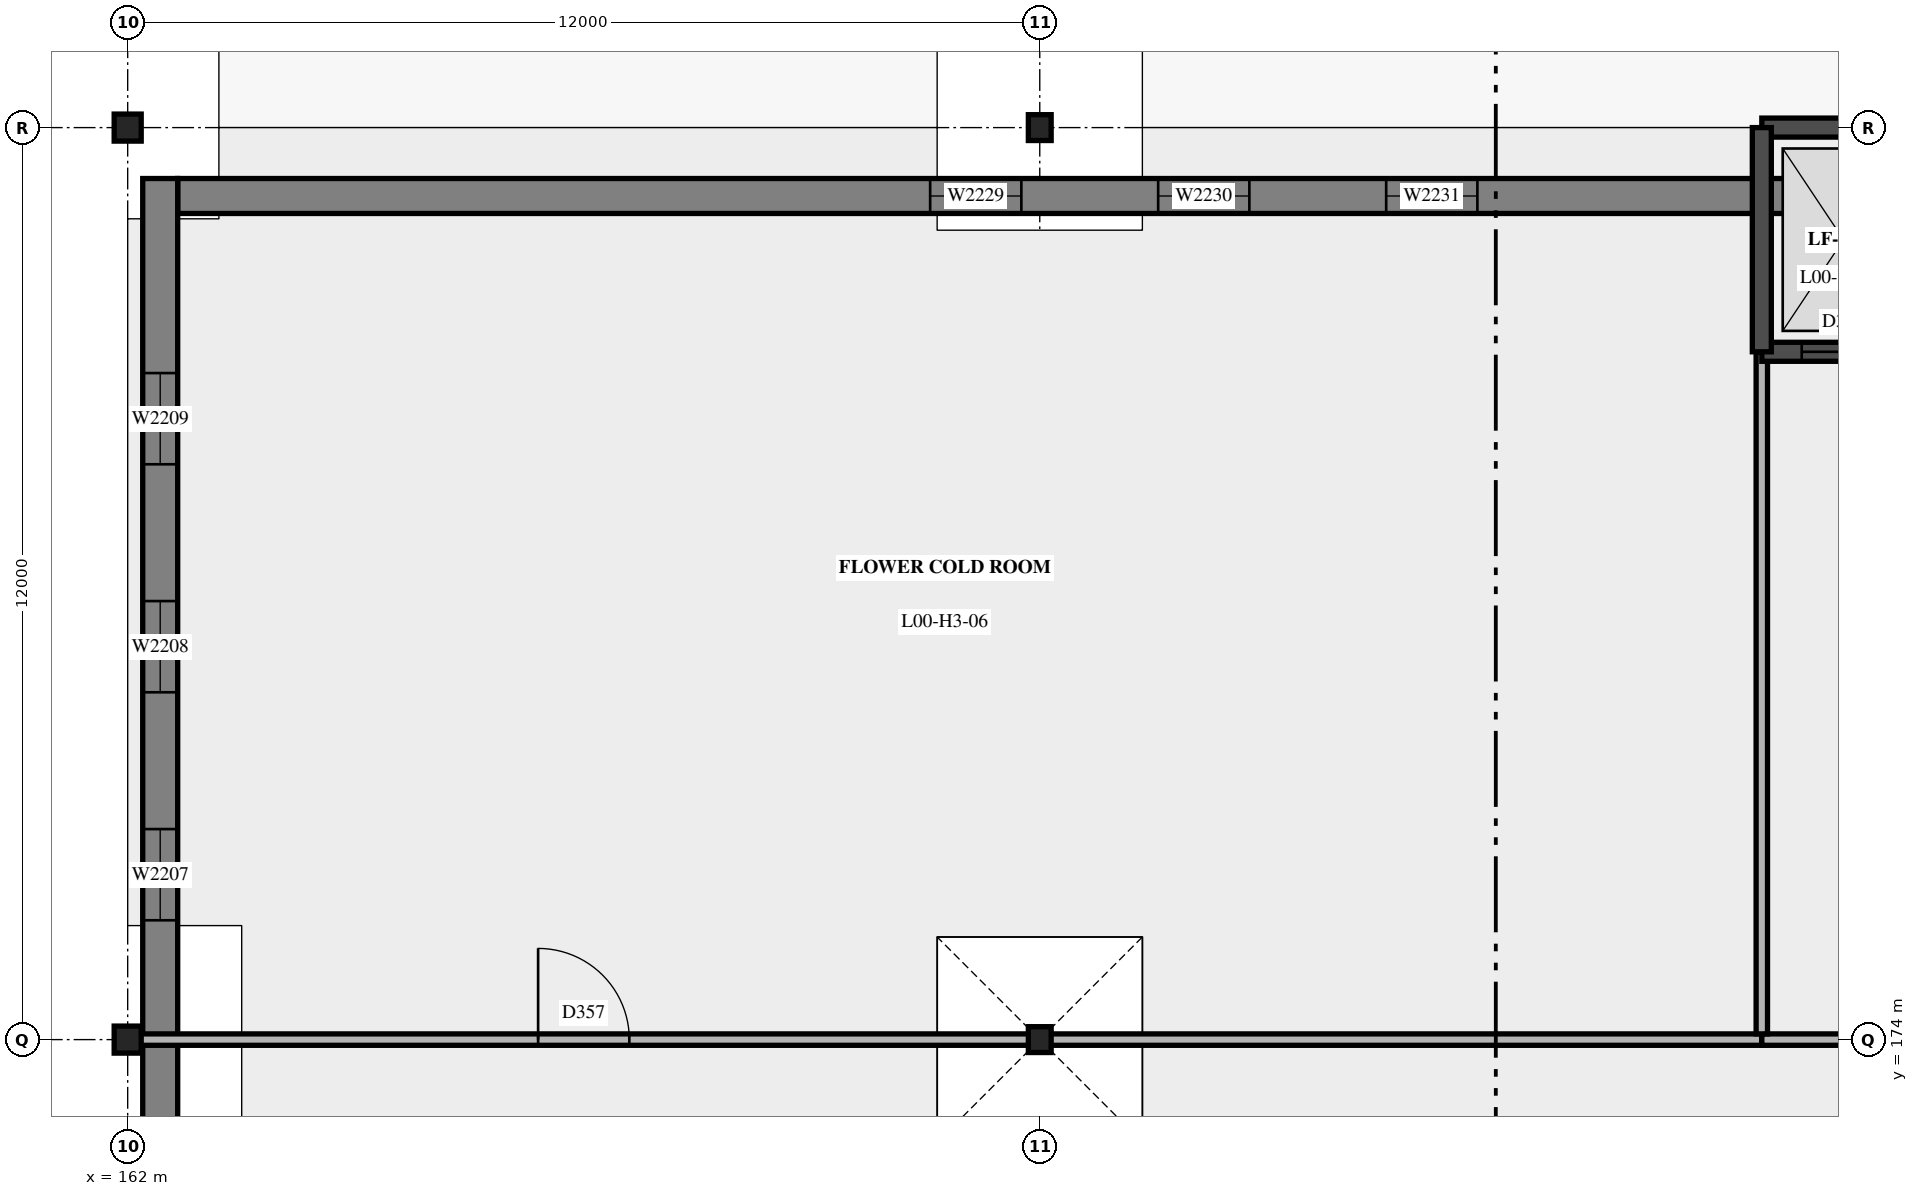
"""IFC4 building model, lengths in metres.
Left out: names, types, materials, properties, quantities, classifications, styles, units other than length and angle.
Written with IfcOpenShell. Run it as: python <this file> out.ifc"""

import sys

from ifc_helpers import new_model, si_unit, direction, frame, frame_2d, origin, origin_2d, place, context, subcontext, project, spatial, rectangle, hollow_circle, i_section, extrude, element, fill, save


model = new_model("IFC4")
c1 = context("Model", 3, precision=1e-05, world=origin(), true_north=direction((0.0, 1.0)))
c2 = subcontext(c1, "Body", "Model", "MODEL_VIEW")
j1 = project(units=[si_unit("LENGTHUNIT", "METRE"), si_unit("PLANEANGLEUNIT", "RADIAN")], contexts=[c1])
p1 = place(None, origin())
s1 = spatial("IfcSite", under=j1, at=p1, CompositionType="ELEMENT")
p2 = place(p1, origin())
s2 = spatial("IfcBuilding", under=s1, at=p2, CompositionType="ELEMENT")
p3 = place(p2, origin())
s3 = spatial("IfcBuildingStorey", under=s2, at=p3, CompositionType="ELEMENT", Elevation=0.0)
for number, where, z_axis, x_axis in (
    (1, (162.0, 174.0, 0.0), (0.0, 0.0, 1.0), (1.0, 0.0, 0.0)),
    (2, (162.0, 186.0, 0.0), (0.0, 0.0, 1.0), (1.0, 0.0, 0.0)),
):
    element("IfcColumn", number, at=place(p3, frame(where, z_axis=z_axis, x_axis=x_axis)), inside=s3, PredefinedType="COLUMN", context=c2, shape_type="SweptSolid", body=[
        extrude(hollow_circle(Radius=0.178, WallThickness=0.012, at=origin_2d()), origin(), (0.0, 0.0, 1.0), 5.4),
    ])
for number, where, z_axis, x_axis in (
    (3, (174.0, 174.0, 0.0), (0.0, 0.0, 1.0), (1.0, 0.0, 0.0)),
    (4, (174.0, 186.0, 0.0), (0.0, 0.0, 1.0), (1.0, 0.0, 0.0)),
):
    element("IfcColumn", number, at=place(p3, frame(where, z_axis=z_axis, x_axis=x_axis)), inside=s3, PredefinedType="COLUMN", context=c2, shape_type="SweptSolid", body=[
        extrude(i_section(OverallWidth=0.3, OverallDepth=0.34, WebThickness=0.012, FlangeThickness=0.021, at=origin_2d()), origin(), (0.0, 0.0, 1.0), 4.65),
    ])
p4 = place(p3, frame((162.658, 185.1, 0.0), z_axis=(0.0, 0.0, 1.0), x_axis=(1.0, 0.0, 0.0)))
e5 = element("IfcWall", 5, at=p4, inside=s3, PredefinedType="SOLIDWALL", context=c2, shape_type="SweptSolid", body=[
    extrude(rectangle(XDim=34.685, YDim=0.46, at=frame_2d((17.342, 0.0))), origin(), (0.0, 0.0, 1.0), 5.4),
])
p5 = place(p4, frame((9.9, 0.0, 0.9)))
e6 = element("IfcOpeningElement", 6, at=p5, cuts=e5, PredefinedType="OPENING", context=c2, shape_type="SweptSolid", body=[
    extrude(rectangle(XDim=1.2, YDim=3.3, at=frame_2d((0.6, 1.65))), frame((0.0, 0.24, 0.0), z_axis=(0.0, -1.0, 0.0), x_axis=(1.0, 0.0, 0.0)), (0.0, 0.0, 1.0), 0.48),
])
p6 = place(p4, frame((12.9, 0.0, 0.9)))
e7 = element("IfcOpeningElement", 7, at=p6, cuts=e5, PredefinedType="OPENING", context=c2, shape_type="SweptSolid", body=[
    extrude(rectangle(XDim=1.2, YDim=3.3, at=frame_2d((0.6, 1.65))), frame((0.0, 0.24, 0.0), z_axis=(0.0, -1.0, 0.0), x_axis=(1.0, 0.0, 0.0)), (0.0, 0.0, 1.0), 0.48),
])
p7 = place(p4, frame((15.9, 0.0, 0.9)))
e8 = element("IfcOpeningElement", 8, at=p7, cuts=e5, PredefinedType="OPENING", context=c2, shape_type="SweptSolid", body=[
    extrude(rectangle(XDim=1.2, YDim=3.3, at=frame_2d((0.6, 1.65))), frame((0.0, 0.24, 0.0), z_axis=(0.0, -1.0, 0.0), x_axis=(1.0, 0.0, 0.0)), (0.0, 0.0, 1.0), 0.48),
])
p8 = place(p3, frame((162.428, 138.67, 0.0), z_axis=(0.0, 0.0, 1.0), x_axis=(0.0, 1.0, 0.0)))
e9 = element("IfcWall", 9, at=p8, inside=s3, PredefinedType="SOLIDWALL", context=c2, shape_type="SweptSolid", body=[
    extrude(rectangle(XDim=46.66, YDim=0.46, at=frame_2d((23.33, 0.0))), origin(), (0.0, 0.0, 1.0), 5.4),
])
p9 = place(p8, frame((16.13, 0.0, 0.0)))
e10 = element("IfcOpeningElement", 10, at=p9, cuts=e9, PredefinedType="OPENING", context=c2, shape_type="SweptSolid", body=[
    extrude(rectangle(XDim=2.4, YDim=2.4, at=frame_2d((1.2, 1.2))), frame((0.0, 0.24, 0.0), z_axis=(0.0, -1.0, 0.0), x_axis=(1.0, 0.0, 0.0)), (0.0, 0.0, 1.0), 0.48),
])
p10 = place(p8, frame((28.43, 0.0, 0.0)))
e11 = element("IfcOpeningElement", 11, at=p10, cuts=e9, PredefinedType="OPENING", context=c2, shape_type="SweptSolid", body=[
    extrude(rectangle(XDim=1.8, YDim=2.1, at=frame_2d((0.9, 1.05))), frame((0.0, 0.24, 0.0), z_axis=(0.0, -1.0, 0.0), x_axis=(1.0, 0.0, 0.0)), (0.0, 0.0, 1.0), 0.48),
])
p11 = place(p8, frame((3.9, 0.0, 0.9)))
e12 = element("IfcOpeningElement", 12, at=p11, cuts=e9, PredefinedType="OPENING", context=c2, shape_type="SweptSolid", body=[
    extrude(rectangle(XDim=1.2, YDim=3.3, at=frame_2d((0.6, 1.65))), frame((0.0, 0.24, 0.0), z_axis=(0.0, -1.0, 0.0), x_axis=(1.0, 0.0, 0.0)), (0.0, 0.0, 1.0), 0.48),
])
p12 = place(p8, frame((24.9, 0.0, 0.9)))
e13 = element("IfcOpeningElement", 13, at=p12, cuts=e9, PredefinedType="OPENING", context=c2, shape_type="SweptSolid", body=[
    extrude(rectangle(XDim=1.2, YDim=3.3, at=frame_2d((0.6, 1.65))), frame((0.0, 0.24, 0.0), z_axis=(0.0, -1.0, 0.0), x_axis=(1.0, 0.0, 0.0)), (0.0, 0.0, 1.0), 0.48),
])
p13 = place(p8, frame((30.9, 0.0, 0.9)))
e14 = element("IfcOpeningElement", 14, at=p13, cuts=e9, PredefinedType="OPENING", context=c2, shape_type="SweptSolid", body=[
    extrude(rectangle(XDim=1.2, YDim=3.3, at=frame_2d((0.6, 1.65))), frame((0.0, 0.24, 0.0), z_axis=(0.0, -1.0, 0.0), x_axis=(1.0, 0.0, 0.0)), (0.0, 0.0, 1.0), 0.48),
])
p14 = place(p8, frame((36.9, 0.0, 0.9)))
e15 = element("IfcOpeningElement", 15, at=p14, cuts=e9, PredefinedType="OPENING", context=c2, shape_type="SweptSolid", body=[
    extrude(rectangle(XDim=1.2, YDim=3.3, at=frame_2d((0.6, 1.65))), frame((0.0, 0.24, 0.0), z_axis=(0.0, -1.0, 0.0), x_axis=(1.0, 0.0, 0.0)), (0.0, 0.0, 1.0), 0.48),
])
p15 = place(p8, frame((39.9, 0.0, 0.9)))
e16 = element("IfcOpeningElement", 16, at=p15, cuts=e9, PredefinedType="OPENING", context=c2, shape_type="SweptSolid", body=[
    extrude(rectangle(XDim=1.2, YDim=3.3, at=frame_2d((0.6, 1.65))), frame((0.0, 0.24, 0.0), z_axis=(0.0, -1.0, 0.0), x_axis=(1.0, 0.0, 0.0)), (0.0, 0.0, 1.0), 0.48),
])
p16 = place(p8, frame((42.9, 0.0, 0.9)))
e17 = element("IfcOpeningElement", 17, at=p16, cuts=e9, PredefinedType="OPENING", context=c2, shape_type="SweptSolid", body=[
    extrude(rectangle(XDim=1.2, YDim=3.3, at=frame_2d((0.6, 1.65))), frame((0.0, 0.24, 0.0), z_axis=(0.0, -1.0, 0.0), x_axis=(1.0, 0.0, 0.0)), (0.0, 0.0, 1.0), 0.48),
])
p17 = place(p3, frame((162.0, 174.0, 0.0), z_axis=(0.0, 0.0, 1.0), x_axis=(1.0, 0.0, 0.0)))
e18 = element("IfcWall", 18, at=p17, inside=s3, PredefinedType="PARTITIONING", context=c2, shape_type="SweptSolid", body=[
    extrude(rectangle(XDim=21.5, YDim=0.15, at=frame_2d((10.75, 0.0))), origin(), (0.0, 0.0, 1.0), 4.65),
])
p18 = place(p17, frame((5.4, 0.0, 0.0)))
e19 = element("IfcOpeningElement", 19, at=p18, cuts=e18, PredefinedType="OPENING", context=c2, shape_type="SweptSolid", body=[
    extrude(rectangle(XDim=1.2, YDim=2.4, at=frame_2d((0.6, 1.2))), frame((0.0, 0.085, 0.0), z_axis=(0.0, -1.0, 0.0), x_axis=(1.0, 0.0, 0.0)), (0.0, 0.0, 1.0), 0.17),
])
p19 = place(p3, frame((183.5, 174.0, 0.0), z_axis=(0.0, 0.0, 1.0), x_axis=(1.0, 0.0, 0.0)))
e20 = element("IfcWall", 20, at=p19, inside=s3, PredefinedType="PARTITIONING", context=c2, shape_type="SweptSolid", body=[
    extrude(rectangle(XDim=9.7, YDim=0.15, at=frame_2d((4.85, 0.0))), origin(), (0.0, 0.0, 1.0), 4.65),
])
p20 = place(p19, frame((5.6, 0.0, 0.0)))
e21 = element("IfcOpeningElement", 21, at=p20, cuts=e20, PredefinedType="OPENING", context=c2, shape_type="SweptSolid", body=[
    extrude(rectangle(XDim=1.8, YDim=2.1, at=frame_2d((0.9, 1.05))), frame((0.0, 0.085, 0.0), z_axis=(0.0, -1.0, 0.0), x_axis=(1.0, 0.0, 0.0)), (0.0, 0.0, 1.0), 0.17),
])
p21 = place(p3, frame((183.5, 174.075, 0.0), z_axis=(0.0, 0.0, 1.0), x_axis=(0.0, 1.0, 0.0)))
e22 = element("IfcWall", 22, at=p21, inside=s3, PredefinedType="PARTITIONING", context=c2, shape_type="SweptSolid", body=[
    extrude(rectangle(XDim=8.975, YDim=0.15, at=frame_2d((4.488, 0.0))), origin(), (0.0, 0.0, 1.0), 4.75),
])
p22 = place(p3, frame((185.65, 186.0, -1.4), z_axis=(0.0, 0.0, 1.0), x_axis=(-1.0, 0.0, 0.0)))
e23 = element("IfcWall", 23, at=p22, inside=s3, PredefinedType="SHEAR", context=c2, shape_type="SweptSolid", body=[
    extrude(rectangle(XDim=2.15, YDim=0.25, at=frame_2d((1.075, 0.0))), origin(), (0.0, 0.0, 1.0), 6.8),
])
p23 = place(p3, frame((183.5, 183.05, -1.4), z_axis=(0.0, 0.0, 1.0), x_axis=(1.0, 0.0, 0.0)))
e24 = element("IfcWall", 24, at=p23, inside=s3, PredefinedType="SHEAR", context=c2, shape_type="SweptSolid", body=[
    extrude(rectangle(XDim=2.15, YDim=0.25, at=frame_2d((1.075, 0.0))), origin(), (0.0, 0.0, 1.0), 6.8),
])
p24 = place(p23, frame((0.525, 0.0, 1.4)))
e25 = element("IfcOpeningElement", 25, at=p24, cuts=e24, PredefinedType="OPENING", context=c2, shape_type="SweptSolid", body=[
    extrude(rectangle(XDim=1.1, YDim=2.1, at=frame_2d((0.55, 1.05))), frame((0.0, 0.135, 0.0), z_axis=(0.0, -1.0, 0.0), x_axis=(1.0, 0.0, 0.0)), (0.0, 0.0, 1.0), 0.27),
])
p25 = place(p3, frame((183.5, 186.0, -1.4), z_axis=(0.0, 0.0, 1.0), x_axis=(0.0, -1.0, 0.0)))
e26 = element("IfcWall", 26, at=p25, inside=s3, PredefinedType="SHEAR", context=c2, shape_type="SweptSolid", body=[
    extrude(rectangle(XDim=2.95, YDim=0.25, at=frame_2d((1.475, 0.0))), origin(), (0.0, 0.0, 1.0), 6.8),
])
p26 = place(p14, origin())
e27 = element("IfcWindow", 27, at=p26, inside=s3, PartitioningType="SINGLE_PANEL", PredefinedType="WINDOW", context=c2, shape_type="SweptSolid", body=[
    extrude(rectangle(XDim=1.2, YDim=3.3, at=frame_2d((0.6, 1.65))), frame((0.0, 0.03, 0.0), z_axis=(0.0, -1.0, 0.0), x_axis=(1.0, 0.0, 0.0)), (0.0, 0.0, 1.0), 0.06),
])
fill(e15, e27)
p27 = place(p15, origin())
e28 = element("IfcWindow", 28, at=p27, inside=s3, PartitioningType="SINGLE_PANEL", PredefinedType="WINDOW", context=c2, shape_type="SweptSolid", body=[
    extrude(rectangle(XDim=1.2, YDim=3.3, at=frame_2d((0.6, 1.65))), frame((0.0, 0.03, 0.0), z_axis=(0.0, -1.0, 0.0), x_axis=(1.0, 0.0, 0.0)), (0.0, 0.0, 1.0), 0.06),
])
fill(e16, e28)
p28 = place(p16, origin())
e29 = element("IfcWindow", 29, at=p28, inside=s3, PartitioningType="SINGLE_PANEL", PredefinedType="WINDOW", context=c2, shape_type="SweptSolid", body=[
    extrude(rectangle(XDim=1.2, YDim=3.3, at=frame_2d((0.6, 1.65))), frame((0.0, 0.03, 0.0), z_axis=(0.0, -1.0, 0.0), x_axis=(1.0, 0.0, 0.0)), (0.0, 0.0, 1.0), 0.06),
])
fill(e17, e29)
p29 = place(p5, origin())
e30 = element("IfcWindow", 30, at=p29, inside=s3, PartitioningType="SINGLE_PANEL", PredefinedType="WINDOW", context=c2, shape_type="SweptSolid", body=[
    extrude(rectangle(XDim=1.2, YDim=3.3, at=frame_2d((0.6, 1.65))), frame((0.0, 0.03, 0.0), z_axis=(0.0, -1.0, 0.0), x_axis=(1.0, 0.0, 0.0)), (0.0, 0.0, 1.0), 0.06),
])
fill(e6, e30)
p30 = place(p6, origin())
e31 = element("IfcWindow", 31, at=p30, inside=s3, PartitioningType="SINGLE_PANEL", PredefinedType="WINDOW", context=c2, shape_type="SweptSolid", body=[
    extrude(rectangle(XDim=1.2, YDim=3.3, at=frame_2d((0.6, 1.65))), frame((0.0, 0.03, 0.0), z_axis=(0.0, -1.0, 0.0), x_axis=(1.0, 0.0, 0.0)), (0.0, 0.0, 1.0), 0.06),
])
fill(e7, e31)
p31 = place(p7, origin())
e32 = element("IfcWindow", 32, at=p31, inside=s3, PartitioningType="SINGLE_PANEL", PredefinedType="WINDOW", context=c2, shape_type="SweptSolid", body=[
    extrude(rectangle(XDim=1.2, YDim=3.3, at=frame_2d((0.6, 1.65))), frame((0.0, 0.03, 0.0), z_axis=(0.0, -1.0, 0.0), x_axis=(1.0, 0.0, 0.0)), (0.0, 0.0, 1.0), 0.06),
])
fill(e8, e32)
p32 = place(p18, origin())
e33 = element("IfcDoor", 33, at=p32, inside=s3, OperationType="SINGLE_SWING_LEFT", PredefinedType="DOOR", context=c2, shape_type="SweptSolid", body=[
    extrude(rectangle(XDim=1.2, YDim=2.4, at=frame_2d((0.6, 1.2))), frame((0.0, 0.025, 0.0), z_axis=(0.0, -1.0, 0.0), x_axis=(1.0, 0.0, 0.0)), (0.0, 0.0, 1.0), 0.05),
])
fill(e19, e33)
p33 = place(p24, origin())
e34 = element("IfcDoor", 34, at=p33, inside=s3, OperationType="SLIDING_TO_LEFT", PredefinedType="DOOR", context=c2, shape_type="SweptSolid", body=[
    extrude(rectangle(XDim=1.1, YDim=2.1, at=frame_2d((0.55, 1.05))), frame((0.0, 0.025, 0.0), z_axis=(0.0, -1.0, 0.0), x_axis=(1.0, 0.0, 0.0)), (0.0, 0.0, 1.0), 0.05),
])
fill(e25, e34)
save(model, sys.argv[1])
